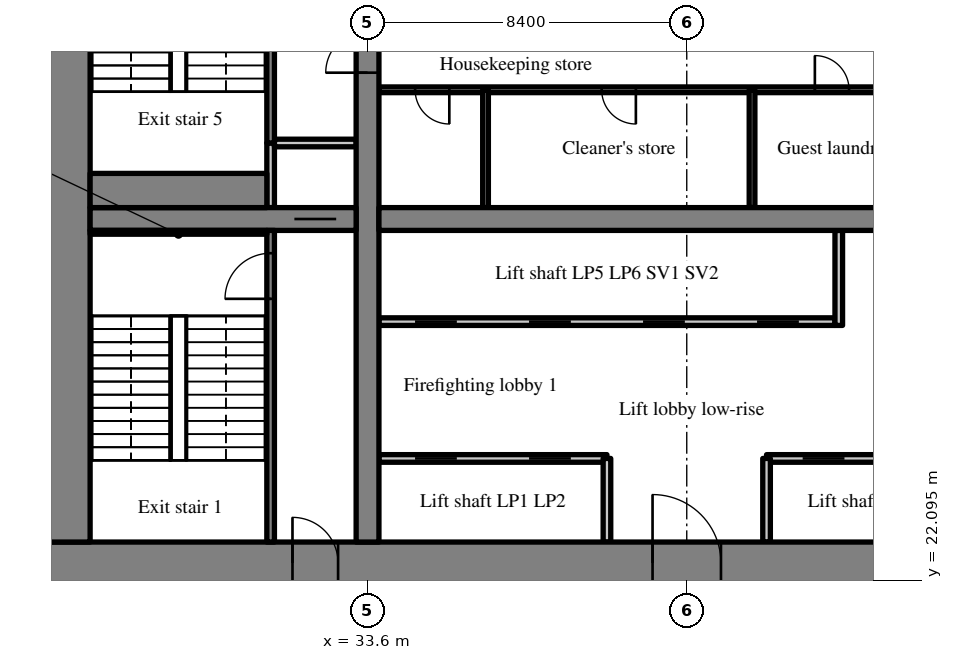
"""IFC4 building model, lengths in metres.
Left out: names, types, materials, properties, quantities, classifications, styles, units other than length and angle.
Written with IfcOpenShell. Run it as: python <this file> out.ifc"""

import sys

from ifc_helpers import new_model, si_unit, direction, frame, frame_2d, origin, place, context, subcontext, project, spatial, rectangle, extrude, source, transform, mapped, element, fill, save


model = new_model("IFC4")
c1 = context("Model", 3, precision=1e-05, world=origin(), true_north=direction((0.0, 1.0)))
c2 = subcontext(c1, "Body", "Model", "MODEL_VIEW")
j1 = project(units=[si_unit("LENGTHUNIT", "METRE"), si_unit("PLANEANGLEUNIT", "RADIAN")], contexts=[c1])
p1 = place(None, origin())
s1 = spatial("IfcSite", under=j1, at=p1, CompositionType="ELEMENT")
p2 = place(p1, origin())
s2 = spatial("IfcBuilding", under=s1, at=p2, CompositionType="ELEMENT")
p3 = place(p2, frame((0.0, 0.0, 39.2)))
s3 = spatial("IfcBuildingStorey", under=s2, at=p3, CompositionType="ELEMENT", Elevation=39.2)
m1 = source(origin(), c2, "Body", "SweptSolid", [
    extrude(rectangle(XDim=50.4, YDim=1.1, at=frame_2d((25.2, 0.0))), origin(), (0.0, 0.0, 1.0), 3.52),
])
p4 = place(p3, frame((25.2, 22.55, 0.0), z_axis=(0.0, 0.0, 1.0), x_axis=(1.0, 0.0, 0.0)))
e1 = element("IfcWall", 1, at=p4, inside=s3, PredefinedType="SHEAR", context=c2, shape_type="MappedRepresentation", body=[
    mapped(m1, transform((0.0, 0.0, 0.0), scale=1.0)),
])
m2 = source(origin(), c2, "Body", "SweptSolid", [
    extrude(rectangle(XDim=1.8, YDim=2.1, at=frame_2d((0.9, 1.05))), frame((0.0, 0.56, 0.0), z_axis=(0.0, -1.0, 0.0), x_axis=(1.0, 0.0, 0.0)), (0.0, 0.0, 1.0), 1.12),
])
p5 = place(p4, frame((15.9, 0.0, 0.0)))
e2 = element("IfcOpeningElement", 2, at=p5, cuts=e1, PredefinedType="OPENING", context=c2, shape_type="MappedRepresentation", body=[
    mapped(m2, transform((0.0, 0.0, 0.0), scale=1.0)),
])
m3 = source(origin(), c2, "Body", "SweptSolid", [
    extrude(rectangle(XDim=1.2, YDim=2.1, at=frame_2d((0.6, 1.05))), frame((0.0, 0.56, 0.0), z_axis=(0.0, -1.0, 0.0), x_axis=(1.0, 0.0, 0.0)), (0.0, 0.0, 1.0), 1.12),
])
p6 = place(p4, frame((27.0, 0.0, 0.0)))
e3 = element("IfcOpeningElement", 3, at=p6, cuts=e1, PredefinedType="OPENING", context=c2, shape_type="MappedRepresentation", body=[
    mapped(m3, transform((0.0, 0.0, 0.0), scale=1.0)),
])
m4 = source(origin(), c2, "Body", "SweptSolid", [
    extrude(rectangle(XDim=0.9, YDim=2.1, at=frame_2d((0.45, 1.05))), frame((0.0, 0.56, 0.0), z_axis=(0.0, -1.0, 0.0), x_axis=(1.0, 0.0, 0.0)), (0.0, 0.0, 1.0), 1.12),
])
p7 = place(p4, frame((33.75, 0.0, 0.0)))
e4 = element("IfcOpeningElement", 4, at=p7, cuts=e1, PredefinedType="OPENING", context=c2, shape_type="MappedRepresentation", body=[
    mapped(m4, transform((0.0, 0.0, 0.0), scale=1.0)),
])
p8 = place(p4, frame((30.75, 0.0, 0.0)))
e5 = element("IfcOpeningElement", 5, at=p8, cuts=e1, PredefinedType="OPENING", context=c2, shape_type="MappedRepresentation", body=[
    mapped(m4, transform((0.0, 0.0, 0.0), scale=1.0)),
])
p9 = place(p4, frame((39.75, 0.0, 0.0)))
e6 = element("IfcOpeningElement", 6, at=p9, cuts=e1, PredefinedType="OPENING", context=c2, shape_type="MappedRepresentation", body=[
    mapped(m4, transform((0.0, 0.0, 0.0), scale=1.0)),
])
p10 = place(p4, frame((36.75, 0.0, 0.0)))
e7 = element("IfcOpeningElement", 7, at=p10, cuts=e1, PredefinedType="OPENING", context=c2, shape_type="MappedRepresentation", body=[
    mapped(m4, transform((0.0, 0.0, 0.0), scale=1.0)),
])
p11 = place(p4, frame((6.425, 0.0, 0.0)))
e8 = element("IfcOpeningElement", 8, at=p11, cuts=e1, PredefinedType="OPENING", context=c2, shape_type="MappedRepresentation", body=[
    mapped(m3, transform((0.0, 0.0, 0.0), scale=1.0)),
])
p12 = place(p4, frame((47.675, 0.0, 0.0)))
e9 = element("IfcOpeningElement", 9, at=p12, cuts=e1, PredefinedType="OPENING", context=c2, shape_type="MappedRepresentation", body=[
    mapped(m3, transform((0.0, 0.0, 0.0), scale=1.0)),
])
m5 = source(origin(), c2, "Body", "SweptSolid", [
    extrude(rectangle(XDim=17.8, YDim=1.1, at=frame_2d((8.9, 0.0))), origin(), (0.0, 0.0, 1.0), 3.52),
])
p13 = place(p3, frame((25.75, 23.1, 0.0), z_axis=(0.0, 0.0, 1.0), x_axis=(0.0, 1.0, 0.0)))
e10 = element("IfcWall", 10, at=p13, inside=s3, PredefinedType="SHEAR", context=c2, shape_type="MappedRepresentation", body=[
    mapped(m5, transform((0.0, 0.0, 0.0), scale=1.0)),
])
m6 = source(origin(), c2, "Body", "SweptSolid", [
    extrude(rectangle(XDim=17.8, YDim=0.6, at=frame_2d((8.9, 0.0))), origin(), (0.0, 0.0, 1.0), 3.52),
])
p14 = place(p3, frame((33.6, 23.1, 0.0), z_axis=(0.0, 0.0, 1.0), x_axis=(0.0, 1.0, 0.0)))
e11 = element("IfcWall", 11, at=p14, inside=s3, PredefinedType="SHEAR", context=c2, shape_type="MappedRepresentation", body=[
    mapped(m6, transform((0.0, 0.0, 0.0), scale=1.0)),
])
m7 = source(origin(), c2, "Body", "SweptSolid", [
    extrude(rectangle(XDim=1.1, YDim=2.1, at=frame_2d((0.55, 1.05))), frame((0.0, 0.31, 0.0), z_axis=(0.0, -1.0, 0.0), x_axis=(1.0, 0.0, 0.0)), (0.0, 0.0, 1.0), 0.62),
])
p15 = place(p14, frame((12.35, 0.0, 0.0)))
e12 = element("IfcOpeningElement", 12, at=p15, cuts=e11, PredefinedType="OPENING", context=c2, shape_type="MappedRepresentation", body=[
    mapped(m7, transform((0.0, 0.0, 0.0), scale=1.0)),
])
m8 = source(origin(), c2, "Body", "SweptSolid", [
    extrude(rectangle(XDim=7.0, YDim=0.6, at=frame_2d((3.5, 0.0))), origin(), (0.0, 0.0, 1.0), 3.52),
])
p16 = place(p3, frame((26.3, 31.6, 0.0), z_axis=(0.0, 0.0, 1.0), x_axis=(1.0, 0.0, 0.0)))
e13 = element("IfcWall", 13, at=p16, inside=s3, PredefinedType="SHEAR", context=c2, shape_type="MappedRepresentation", body=[
    mapped(m8, transform((0.0, 0.0, 0.0), scale=1.0)),
])
p17 = place(p16, frame((5.375, 0.0, 0.0)))
e14 = element("IfcOpeningElement", 14, at=p17, cuts=e13, PredefinedType="OPENING", context=c2, shape_type="MappedRepresentation", body=[
    mapped(m7, transform((0.0, 0.0, 0.0), scale=1.0)),
])
m9 = source(origin(), c2, "Body", "SweptSolid", [
    extrude(rectangle(XDim=16.2, YDim=0.6, at=frame_2d((8.1, 0.0))), origin(), (0.0, 0.0, 1.0), 3.52),
])
p18 = place(p3, frame((33.9, 31.6, 0.0), z_axis=(0.0, 0.0, 1.0), x_axis=(1.0, 0.0, 0.0)))
e15 = element("IfcWall", 15, at=p18, inside=s3, PredefinedType="SHEAR", context=c2, shape_type="MappedRepresentation", body=[
    mapped(m9, transform((0.0, 0.0, 0.0), scale=1.0)),
])
m10 = source(origin(), c2, "Body", "SweptSolid", [
    extrude(rectangle(XDim=1.0, YDim=2.1, at=frame_2d((0.5, 1.05))), frame((0.0, 0.31, 0.0), z_axis=(0.0, -1.0, 0.0), x_axis=(1.0, 0.0, 0.0)), (0.0, 0.0, 1.0), 0.62),
])
p19 = place(p18, frame((14.65, 0.0, 0.0)))
e16 = element("IfcOpeningElement", 16, at=p19, cuts=e15, PredefinedType="OPENING", context=c2, shape_type="MappedRepresentation", body=[
    mapped(m10, transform((0.0, 0.0, 0.0), scale=1.0)),
])
m11 = source(origin(), c2, "Body", "SweptSolid", [
    extrude(rectangle(XDim=6.0, YDim=0.2, at=frame_2d((3.0, 0.0))), origin(), (0.0, 0.0, 1.0), 3.52),
])
p20 = place(p3, frame((33.9, 25.3, 0.0), z_axis=(0.0, 0.0, 1.0), x_axis=(1.0, 0.0, 0.0)))
e17 = element("IfcWall", 17, at=p20, inside=s3, PredefinedType="SOLIDWALL", context=c2, shape_type="MappedRepresentation", body=[
    mapped(m11, transform((0.0, 0.0, 0.0), scale=1.0)),
])
m12 = source(origin(), c2, "Body", "SweptSolid", [
    extrude(rectangle(XDim=1.1, YDim=2.1, at=frame_2d((0.55, 1.05))), frame((0.0, 0.11, 0.0), z_axis=(0.0, -1.0, 0.0), x_axis=(1.0, 0.0, 0.0)), (0.0, 0.0, 1.0), 0.22),
])
p21 = place(p20, frame((0.95, 0.0, 0.0)))
e18 = element("IfcOpeningElement", 18, at=p21, cuts=e17, PredefinedType="OPENING", context=c2, shape_type="MappedRepresentation", body=[
    mapped(m12, transform((0.0, 0.0, 0.0), scale=1.0)),
])
p22 = place(p20, frame((3.95, 0.0, 0.0)))
e19 = element("IfcOpeningElement", 19, at=p22, cuts=e17, PredefinedType="OPENING", context=c2, shape_type="MappedRepresentation", body=[
    mapped(m12, transform((0.0, 0.0, 0.0), scale=1.0)),
])
p23 = place(p3, frame((44.1, 25.3, 0.0), z_axis=(0.0, 0.0, 1.0), x_axis=(1.0, 0.0, 0.0)))
e20 = element("IfcWall", 20, at=p23, inside=s3, PredefinedType="SOLIDWALL", context=c2, shape_type="MappedRepresentation", body=[
    mapped(m11, transform((0.0, 0.0, 0.0), scale=1.0)),
])
p24 = place(p23, frame((0.95, 0.0, 0.0)))
e21 = element("IfcOpeningElement", 21, at=p24, cuts=e20, PredefinedType="OPENING", context=c2, shape_type="MappedRepresentation", body=[
    mapped(m12, transform((0.0, 0.0, 0.0), scale=1.0)),
])
p25 = place(p23, frame((3.95, 0.0, 0.0)))
e22 = element("IfcOpeningElement", 22, at=p25, cuts=e20, PredefinedType="OPENING", context=c2, shape_type="MappedRepresentation", body=[
    mapped(m12, transform((0.0, 0.0, 0.0), scale=1.0)),
])
m13 = source(origin(), c2, "Body", "SweptSolid", [
    extrude(rectangle(XDim=12.0, YDim=0.2, at=frame_2d((6.0, 0.0))), origin(), (0.0, 0.0, 1.0), 3.52),
])
p26 = place(p3, frame((33.9, 28.9, 0.0), z_axis=(0.0, 0.0, 1.0), x_axis=(1.0, 0.0, 0.0)))
e23 = element("IfcWall", 23, at=p26, inside=s3, PredefinedType="SOLIDWALL", context=c2, shape_type="MappedRepresentation", body=[
    mapped(m13, transform((0.0, 0.0, 0.0), scale=1.0)),
])
p27 = place(p26, frame((0.95, 0.0, 0.0)))
e24 = element("IfcOpeningElement", 24, at=p27, cuts=e23, PredefinedType="OPENING", context=c2, shape_type="MappedRepresentation", body=[
    mapped(m12, transform((0.0, 0.0, 0.0), scale=1.0)),
])
p28 = place(p26, frame((3.95, 0.0, 0.0)))
e25 = element("IfcOpeningElement", 25, at=p28, cuts=e23, PredefinedType="OPENING", context=c2, shape_type="MappedRepresentation", body=[
    mapped(m12, transform((0.0, 0.0, 0.0), scale=1.0)),
])
p29 = place(p26, frame((6.95, 0.0, 0.0)))
e26 = element("IfcOpeningElement", 26, at=p29, cuts=e23, PredefinedType="OPENING", context=c2, shape_type="MappedRepresentation", body=[
    mapped(m12, transform((0.0, 0.0, 0.0), scale=1.0)),
])
p30 = place(p26, frame((9.95, 0.0, 0.0)))
e27 = element("IfcOpeningElement", 27, at=p30, cuts=e23, PredefinedType="OPENING", context=c2, shape_type="MappedRepresentation", body=[
    mapped(m12, transform((0.0, 0.0, 0.0), scale=1.0)),
])
m14 = source(origin(), c2, "Body", "SweptSolid", [
    extrude(rectangle(XDim=2.2, YDim=0.2, at=frame_2d((1.1, 0.0))), origin(), (0.0, 0.0, 1.0), 3.52),
])
for number, where, z_axis, x_axis in (
    (28, (39.9, 23.1, 0.0), (0.0, 0.0, 1.0), (0.0, 1.0, 0.0)),
    (29, (44.1, 23.1, 0.0), (0.0, 0.0, 1.0), (0.0, 1.0, 0.0)),
):
    element("IfcWall", number, at=place(p3, frame(where, z_axis=z_axis, x_axis=x_axis)), inside=s3, PredefinedType="SOLIDWALL", context=c2, shape_type="MappedRepresentation", body=[
        mapped(m14, transform((0.0, 0.0, 0.0), scale=1.0)),
    ])
m15 = source(origin(), c2, "Body", "SweptSolid", [
    extrude(rectangle(XDim=2.5, YDim=0.2, at=frame_2d((1.25, 0.0))), origin(), (0.0, 0.0, 1.0), 3.52),
])
p31 = place(p3, frame((46.0, 28.8, 0.0), z_axis=(0.0, 0.0, 1.0), x_axis=(0.0, 1.0, 0.0)))
e30 = element("IfcWall", 30, at=p31, inside=s3, PredefinedType="SOLIDWALL", context=c2, shape_type="MappedRepresentation", body=[
    mapped(m15, transform((0.0, 0.0, 0.0), scale=1.0)),
])
m16 = source(origin(), c2, "Body", "SweptSolid", [
    extrude(rectangle(XDim=14.1, YDim=0.15, at=frame_2d((7.05, 0.0))), origin(), (0.0, 0.0, 1.0), 3.52),
])
p32 = place(p3, frame((33.9, 35.0, 0.0), z_axis=(0.0, 0.0, 1.0), x_axis=(1.0, 0.0, 0.0)))
e31 = element("IfcWall", 31, at=p32, inside=s3, PredefinedType="PARTITIONING", context=c2, shape_type="MappedRepresentation", body=[
    mapped(m16, transform((0.0, 0.0, 0.0), scale=1.0)),
])
m17 = source(origin(), c2, "Body", "SweptSolid", [
    extrude(rectangle(XDim=0.9, YDim=2.1, at=frame_2d((0.45, 1.05))), frame((0.0, 0.085, 0.0), z_axis=(0.0, -1.0, 0.0), x_axis=(1.0, 0.0, 0.0)), (0.0, 0.0, 1.0), 0.17),
])
p33 = place(p32, frame((0.952, 0.0, 0.0)))
e32 = element("IfcOpeningElement", 32, at=p33, cuts=e31, PredefinedType="OPENING", context=c2, shape_type="MappedRepresentation", body=[
    mapped(m17, transform((0.0, 0.0, 0.0), scale=1.0)),
])
p34 = place(p32, frame((5.861, 0.0, 0.0)))
e33 = element("IfcOpeningElement", 33, at=p34, cuts=e31, PredefinedType="OPENING", context=c2, shape_type="MappedRepresentation", body=[
    mapped(m17, transform((0.0, 0.0, 0.0), scale=1.0)),
])
p35 = place(p32, frame((11.471, 0.0, 0.0)))
e34 = element("IfcOpeningElement", 34, at=p35, cuts=e31, PredefinedType="OPENING", context=c2, shape_type="MappedRepresentation", body=[
    mapped(m17, transform((0.0, 0.0, 0.0), scale=1.0)),
])
m18 = source(origin(), c2, "Body", "SweptSolid", [
    extrude(rectangle(XDim=3.1, YDim=0.15, at=frame_2d((1.55, 0.0))), origin(), (0.0, 0.0, 1.0), 3.52),
])
for number, where, z_axis, x_axis in (
    (35, (36.705, 31.9, 0.0), (0.0, 0.0, 1.0), (0.0, 1.0, 0.0)),
    (36, (43.718, 31.9, 0.0), (0.0, 0.0, 1.0), (0.0, 1.0, 0.0)),
):
    element("IfcWall", number, at=place(p3, frame(where, z_axis=z_axis, x_axis=x_axis)), inside=s3, PredefinedType="PARTITIONING", context=c2, shape_type="MappedRepresentation", body=[
        mapped(m18, transform((0.0, 0.0, 0.0), scale=1.0)),
    ])
m19 = source(origin(), c2, "Body", "SweptSolid", [
    extrude(rectangle(XDim=8.2, YDim=0.2, at=frame_2d((4.1, 0.0))), origin(), (0.0, 0.0, 1.0), 3.52),
])
p36 = place(p3, frame((31.05, 23.1, 0.0), z_axis=(0.0, 0.0, 1.0), x_axis=(0.0, 1.0, 0.0)))
e37 = element("IfcWall", 37, at=p36, inside=s3, PredefinedType="SOLIDWALL", context=c2, shape_type="MappedRepresentation", body=[
    mapped(m19, transform((0.0, 0.0, 0.0), scale=1.0)),
])
m20 = source(origin(), c2, "Body", "SweptSolid", [
    extrude(rectangle(XDim=1.2, YDim=2.1, at=frame_2d((0.6, 1.05))), frame((0.0, 0.11, 0.0), z_axis=(0.0, -1.0, 0.0), x_axis=(1.0, 0.0, 0.0)), (0.0, 0.0, 1.0), 0.22),
])
p37 = place(p36, frame((6.4, 0.0, 0.0)))
e38 = element("IfcOpeningElement", 38, at=p37, cuts=e37, PredefinedType="OPENING", context=c2, shape_type="MappedRepresentation", body=[
    mapped(m20, transform((0.0, 0.0, 0.0), scale=1.0)),
])
m21 = source(origin(), c2, "Body", "SweptSolid", [
    extrude(rectangle(XDim=1.7, YDim=0.2, at=frame_2d((0.85, 0.0))), origin(), (0.0, 0.0, 1.0), 3.52),
])
p38 = place(p3, frame((31.05, 31.9, 0.0), z_axis=(0.0, 0.0, 1.0), x_axis=(0.0, 1.0, 0.0)))
e39 = element("IfcWall", 39, at=p38, inside=s3, PredefinedType="SOLIDWALL", context=c2, shape_type="MappedRepresentation", body=[
    mapped(m21, transform((0.0, 0.0, 0.0), scale=1.0)),
])
m22 = source(origin(), c2, "Body", "SweptSolid", [
    extrude(rectangle(XDim=2.15, YDim=0.2, at=frame_2d((1.075, 0.0))), origin(), (0.0, 0.0, 1.0), 3.52),
])
p39 = place(p3, frame((31.15, 33.6, 0.0), z_axis=(0.0, 0.0, 1.0), x_axis=(1.0, 0.0, 0.0)))
e40 = element("IfcWall", 40, at=p39, inside=s3, PredefinedType="SOLIDWALL", context=c2, shape_type="MappedRepresentation", body=[
    mapped(m22, transform((0.0, 0.0, 0.0), scale=1.0)),
])
m23 = source(origin(), c2, "Body", "SweptSolid", [
    extrude(rectangle(XDim=7.3, YDim=0.2, at=frame_2d((3.65, 0.0))), origin(), (0.0, 0.0, 1.0), 3.52),
])
p40 = place(p3, frame((31.05, 33.6, 0.0), z_axis=(0.0, 0.0, 1.0), x_axis=(0.0, 1.0, 0.0)))
e41 = element("IfcWall", 41, at=p40, inside=s3, PredefinedType="SOLIDWALL", context=c2, shape_type="MappedRepresentation", body=[
    mapped(m23, transform((0.0, 0.0, 0.0), scale=1.0)),
])
m24 = source(origin(), c2, "Body", "SweptSolid", [
    extrude(rectangle(XDim=1.8, YDim=2.1, at=frame_2d((0.9, 1.05))), frame((0.0, 0.11, 0.0), z_axis=(0.0, -1.0, 0.0), x_axis=(1.0, 0.0, 0.0)), (0.0, 0.0, 1.0), 0.22),
])
p41 = place(p40, frame((5.3, 0.0, 0.0)))
e42 = element("IfcOpeningElement", 42, at=p41, cuts=e41, PredefinedType="OPENING", context=c2, shape_type="MappedRepresentation", body=[
    mapped(m24, transform((0.0, 0.0, 0.0), scale=1.0)),
])
m25 = source(origin(), c2, "Body", "SweptSolid", [
    extrude(rectangle(XDim=4.65, YDim=0.1, at=frame_2d((2.325, 0.0))), origin(), (0.0, 0.0, 1.0), 3.52),
])
p42 = place(p3, frame((26.3, 31.25, 0.0), z_axis=(0.0, 0.0, 1.0), x_axis=(1.0, 0.0, 0.0)))
e43 = element("IfcWall", 43, at=p42, inside=s3, PredefinedType="SOLIDWALL", context=c2, shape_type="MappedRepresentation", body=[
    mapped(m25, transform((0.0, 0.0, 0.0), scale=1.0)),
])
m26 = source(origin(), c2, "Body", "SweptSolid", [
    extrude(rectangle(XDim=4.65, YDim=0.9, at=frame_2d((2.325, 0.0))), origin(), (0.0, 0.0, 1.0), 3.52),
])
p43 = place(p3, frame((26.3, 32.35, 0.0), z_axis=(0.0, 0.0, 1.0), x_axis=(1.0, 0.0, 0.0)))
e44 = element("IfcWall", 44, at=p43, inside=s3, PredefinedType="SOLIDWALL", context=c2, shape_type="MappedRepresentation", body=[
    mapped(m26, transform((0.0, 0.0, 0.0), scale=1.0)),
])
m27 = source(origin(), c2, "Body", "SweptSolid", [
    extrude(rectangle(XDim=1.8, YDim=2.1, at=frame_2d((0.9, 1.05))), frame((0.0, 0.325, 0.0), z_axis=(0.0, -1.0, 0.0), x_axis=(1.0, 0.0, 0.0)), (0.0, 0.0, 1.0), 0.05),
])
p44 = place(p5, origin())
e45 = element("IfcDoor", 45, at=p44, inside=s3, OperationType="DOUBLE_DOOR_SINGLE_SWING", PredefinedType="DOOR", context=c2, shape_type="MappedRepresentation", body=[
    mapped(m27, transform((0.0, 0.0, 0.0), scale=1.0)),
])
fill(e2, e45)
m28 = source(origin(), c2, "Body", "SweptSolid", [
    extrude(rectangle(XDim=1.1, YDim=2.1, at=frame_2d((0.55, 1.05))), frame((0.0, 0.025, 0.0), z_axis=(0.0, -1.0, 0.0), x_axis=(1.0, 0.0, 0.0)), (0.0, 0.0, 1.0), 0.05),
])
p45 = place(p21, origin())
e46 = element("IfcDoor", 46, at=p45, inside=s3, OperationType="SLIDING_TO_LEFT", PredefinedType="DOOR", context=c2, shape_type="MappedRepresentation", body=[
    mapped(m28, transform((0.0, 0.0, 0.0), scale=1.0)),
])
fill(e18, e46)
p46 = place(p22, origin())
e47 = element("IfcDoor", 47, at=p46, inside=s3, OperationType="SLIDING_TO_RIGHT", PredefinedType="DOOR", context=c2, shape_type="MappedRepresentation", body=[
    mapped(m28, transform((0.0, 0.0, 0.0), scale=1.0)),
])
fill(e19, e47)
p47 = place(p24, origin())
e48 = element("IfcDoor", 48, at=p47, inside=s3, OperationType="SLIDING_TO_LEFT", PredefinedType="DOOR", context=c2, shape_type="MappedRepresentation", body=[
    mapped(m28, transform((0.0, 0.0, 0.0), scale=1.0)),
])
fill(e21, e48)
p48 = place(p27, origin())
e49 = element("IfcDoor", 49, at=p48, inside=s3, OperationType="SLIDING_TO_LEFT", PredefinedType="DOOR", context=c2, shape_type="MappedRepresentation", body=[
    mapped(m28, transform((0.0, 0.0, 0.0), scale=1.0)),
])
fill(e24, e49)
p49 = place(p28, origin())
e50 = element("IfcDoor", 50, at=p49, inside=s3, OperationType="SLIDING_TO_RIGHT", PredefinedType="DOOR", context=c2, shape_type="MappedRepresentation", body=[
    mapped(m28, transform((0.0, 0.0, 0.0), scale=1.0)),
])
fill(e25, e50)
p50 = place(p29, origin())
e51 = element("IfcDoor", 51, at=p50, inside=s3, OperationType="SLIDING_TO_LEFT", PredefinedType="DOOR", context=c2, shape_type="MappedRepresentation", body=[
    mapped(m28, transform((0.0, 0.0, 0.0), scale=1.0)),
])
fill(e26, e51)
p51 = place(p30, origin())
e52 = element("IfcDoor", 52, at=p51, inside=s3, OperationType="SLIDING_TO_RIGHT", PredefinedType="DOOR", context=c2, shape_type="MappedRepresentation", body=[
    mapped(m28, transform((0.0, 0.0, 0.0), scale=1.0)),
])
fill(e27, e52)
m29 = source(origin(), c2, "Body", "SweptSolid", [
    extrude(rectangle(XDim=0.9, YDim=2.1, at=frame_2d((0.45, 1.05))), frame((0.0, 0.025, 0.0), z_axis=(0.0, -1.0, 0.0), x_axis=(1.0, 0.0, 0.0)), (0.0, 0.0, 1.0), 0.05),
])
p52 = place(p33, origin())
e53 = element("IfcDoor", 53, at=p52, inside=s3, OperationType="SINGLE_SWING_RIGHT", PredefinedType="DOOR", context=c2, shape_type="MappedRepresentation", body=[
    mapped(m29, transform((0.0, 0.0, 0.0), scale=1.0)),
])
fill(e32, e53)
p53 = place(p34, origin())
e54 = element("IfcDoor", 54, at=p53, inside=s3, OperationType="SINGLE_SWING_RIGHT", PredefinedType="DOOR", context=c2, shape_type="MappedRepresentation", body=[
    mapped(m29, transform((0.0, 0.0, 0.0), scale=1.0)),
])
fill(e33, e54)
p54 = place(p35, origin())
e55 = element("IfcDoor", 55, at=p54, inside=s3, OperationType="SINGLE_SWING_LEFT", PredefinedType="DOOR", context=c2, shape_type="MappedRepresentation", body=[
    mapped(m29, transform((0.0, 0.0, 0.0), scale=1.0)),
])
fill(e34, e55)
m30 = source(origin(), c2, "Body", "SweptSolid", [
    extrude(rectangle(XDim=1.2, YDim=2.1, at=frame_2d((0.6, 1.05))), frame((0.0, 0.025, 0.0), z_axis=(0.0, -1.0, 0.0), x_axis=(1.0, 0.0, 0.0)), (0.0, 0.0, 1.0), 0.05),
])
p55 = place(p37, origin())
e56 = element("IfcDoor", 56, at=p55, inside=s3, OperationType="SINGLE_SWING_LEFT", PredefinedType="DOOR", context=c2, shape_type="MappedRepresentation", body=[
    mapped(m30, transform((0.0, 0.0, 0.0), scale=1.0)),
])
fill(e38, e56)
m31 = source(origin(), c2, "Body", "SweptSolid", [
    extrude(rectangle(XDim=1.2, YDim=2.1, at=frame_2d((0.6, 1.05))), frame((0.0, 0.325, 0.0), z_axis=(0.0, -1.0, 0.0), x_axis=(1.0, 0.0, 0.0)), (0.0, 0.0, 1.0), 0.05),
])
p56 = place(p11, origin())
e57 = element("IfcDoor", 57, at=p56, inside=s3, OperationType="SINGLE_SWING_LEFT", PredefinedType="DOOR", context=c2, shape_type="MappedRepresentation", body=[
    mapped(m31, transform((0.0, 0.0, 0.0), scale=1.0)),
])
fill(e8, e57)
p57 = place(p17, origin())
e58 = element("IfcDoor", 58, at=p57, inside=s3, OperationType="SLIDING_TO_RIGHT", PredefinedType="DOOR", context=c2, shape_type="MappedRepresentation", body=[
    mapped(m28, transform((0.0, 0.0, 0.0), scale=1.0)),
])
fill(e14, e58)
p58 = place(p15, origin())
e59 = element("IfcDoor", 59, at=p58, inside=s3, OperationType="SINGLE_SWING_LEFT", PredefinedType="DOOR", context=c2, shape_type="MappedRepresentation", body=[
    mapped(m28, transform((0.0, 0.0, 0.0), scale=1.0)),
])
fill(e12, e59)
save(model, sys.argv[1])
